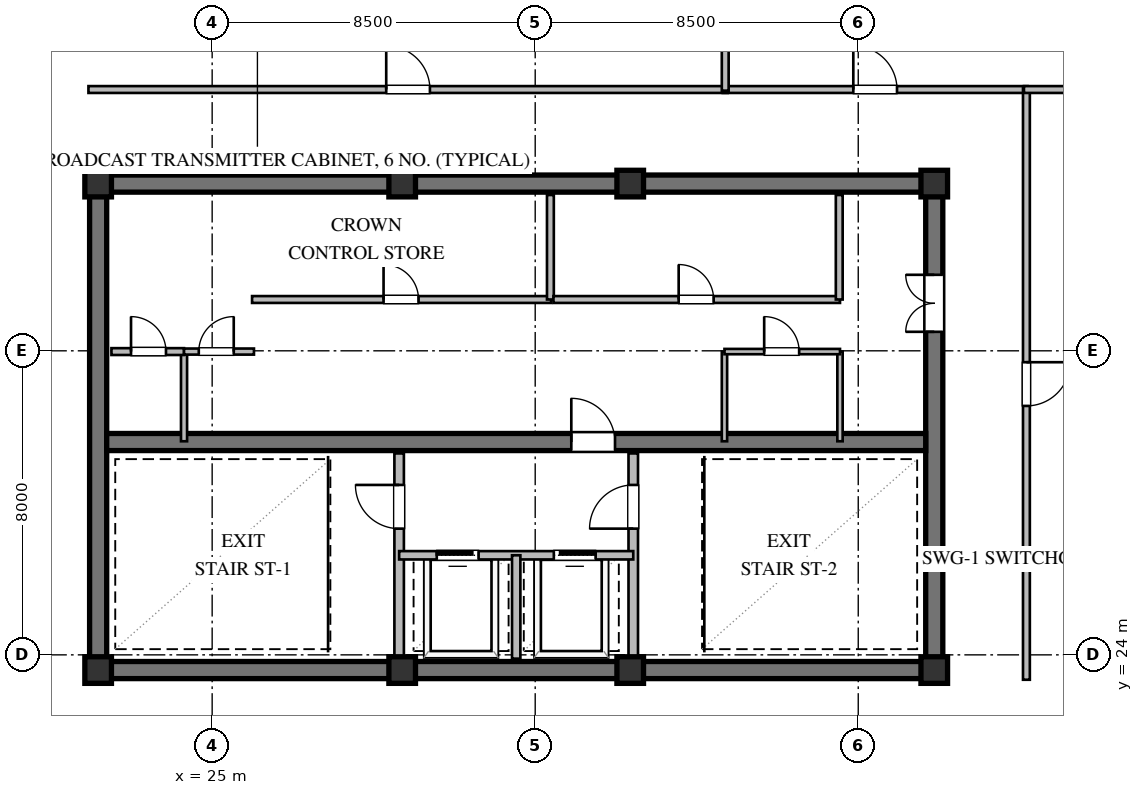
"""IFC4 building model, lengths in metres.
Left out: names, types, materials, properties, quantities, classifications, styles, units other than length and angle.
Written with IfcOpenShell. Run it as: python <this file> out.ifc"""

import sys

from ifc_helpers import new_model, si_unit, direction, frame, frame_2d, origin, origin_2d, place, context, subcontext, project, spatial, rectangle, extrude, element, fill, save


model = new_model("IFC4")
c1 = context("Model", 3, precision=1e-05, world=origin(), true_north=direction((0.0, 1.0)))
c2 = subcontext(c1, "Body", "Model", "MODEL_VIEW")
j1 = project(units=[si_unit("LENGTHUNIT", "METRE"), si_unit("PLANEANGLEUNIT", "RADIAN")], contexts=[c1])
p1 = place(None, origin())
s1 = spatial("IfcSite", under=j1, at=p1, CompositionType="ELEMENT")
p2 = place(p1, origin())
s2 = spatial("IfcBuilding", under=s1, at=p2, CompositionType="ELEMENT")
p3 = place(p2, frame((0.0, 0.0, 308.8)))
s3 = spatial("IfcBuildingStorey", under=s2, at=p3, CompositionType="ELEMENT", Elevation=308.8)
for number, where, z_axis, x_axis in (
    (1, (21.775, 23.6, 0.0), (0.0, 0.0, 1.0), (1.0, 0.0, 0.0)),
    (2, (21.775, 36.4, 0.0), (0.0, 0.0, 1.0), (1.0, 0.0, 0.0)),
):
    element("IfcWall", number, at=place(p3, frame(where, z_axis=z_axis, x_axis=x_axis)), inside=s3, PredefinedType="SHEAR", context=c2, shape_type="SweptSolid", body=[
        extrude(rectangle(XDim=22.45, YDim=0.45, at=frame_2d((11.225, 0.0))), origin(), (0.0, 0.0, 1.0), 3.7),
    ])
p4 = place(p3, frame((22.0, 23.825, 0.0), z_axis=(0.0, 0.0, 1.0), x_axis=(0.0, 1.0, 0.0)))
e3 = element("IfcWall", 3, at=p4, inside=s3, PredefinedType="SHEAR", context=c2, shape_type="SweptSolid", body=[
    extrude(rectangle(XDim=12.35, YDim=0.45, at=frame_2d((6.175, 0.0))), origin(), (0.0, 0.0, 1.0), 3.7),
])
p5 = place(p3, frame((44.0, 23.825, 0.0), z_axis=(0.0, 0.0, 1.0), x_axis=(0.0, 1.0, 0.0)))
e4 = element("IfcWall", 4, at=p5, inside=s3, PredefinedType="SHEAR", context=c2, shape_type="SweptSolid", body=[
    extrude(rectangle(XDim=12.35, YDim=0.45, at=frame_2d((6.175, 0.0))), origin(), (0.0, 0.0, 1.0), 3.7),
])
p6 = place(p5, frame((8.675, 0.0, 0.0)))
e5 = element("IfcOpeningElement", 5, at=p6, cuts=e4, PredefinedType="OPENING", context=c2, shape_type="SweptSolid", body=[
    extrude(rectangle(XDim=1.5, YDim=2.15, at=frame_2d((0.75, 1.075))), frame((0.0, 0.235, 0.0), z_axis=(0.0, -1.0, 0.0), x_axis=(1.0, 0.0, 0.0)), (0.0, 0.0, 1.0), 0.47),
])
p7 = place(p3, frame((22.225, 29.6, 0.0), z_axis=(0.0, 0.0, 1.0), x_axis=(1.0, 0.0, 0.0)))
e6 = element("IfcWall", 6, at=p7, inside=s3, PredefinedType="SHEAR", context=c2, shape_type="SweptSolid", body=[
    extrude(rectangle(XDim=21.55, YDim=0.45, at=frame_2d((10.775, 0.0))), origin(), (0.0, 0.0, 1.0), 3.7),
])
p8 = place(p7, frame((12.225, 0.0, 0.0)))
e7 = element("IfcOpeningElement", 7, at=p8, cuts=e6, PredefinedType="OPENING", context=c2, shape_type="SweptSolid", body=[
    extrude(rectangle(XDim=1.15, YDim=2.1, at=frame_2d((0.575, 1.05))), frame((0.0, 0.235, 0.0), z_axis=(0.0, -1.0, 0.0), x_axis=(1.0, 0.0, 0.0)), (0.0, 0.0, 1.0), 0.47),
])
for number, where, z_axis, x_axis in (
    (8, (22.0, 23.6, 0.0), (0.0, 0.0, 1.0), (1.0, 0.0, 0.0)),
    (9, (30.0, 23.6, 0.0), (0.0, 0.0, 1.0), (1.0, 0.0, 0.0)),
    (10, (36.0, 23.6, 0.0), (0.0, 0.0, 1.0), (1.0, 0.0, 0.0)),
    (11, (44.0, 23.6, 0.0), (0.0, 0.0, 1.0), (1.0, 0.0, 0.0)),
    (12, (44.0, 36.4, 0.0), (0.0, 0.0, 1.0), (1.0, 0.0, 0.0)),
    (13, (36.0, 36.4, 0.0), (0.0, 0.0, 1.0), (1.0, 0.0, 0.0)),
    (14, (30.0, 36.4, 0.0), (0.0, 0.0, 1.0), (1.0, 0.0, 0.0)),
    (15, (22.0, 36.4, 0.0), (0.0, 0.0, 1.0), (1.0, 0.0, 0.0)),
):
    element("IfcColumn", number, at=place(p3, frame(where, z_axis=z_axis, x_axis=x_axis)), inside=s3, PredefinedType="COLUMN", context=c2, shape_type="SweptSolid", body=[
        extrude(rectangle(XDim=0.7, YDim=0.7, at=origin_2d()), origin(), (0.0, 0.0, 1.0), 4.0),
    ])
p9 = place(p3, frame((56.357, 23.077, 0.0), z_axis=(0.0, 0.0, 1.0), x_axis=(-0.814111303181, -0.580708865123, 0.0)))
e16 = element("IfcWall", 16, at=p9, inside=s3, PredefinedType="STANDARD", context=c2, shape_type="SweptSolid", body=[
    extrude(rectangle(XDim=12.481, YDim=0.3, at=frame_2d((6.24, 0.0))), origin(), (0.0, 0.0, 1.0), 3.7),
])
p10 = place(p3, frame((29.92, 23.9, 0.0), z_axis=(0.0, 0.0, 1.0), x_axis=(0.0, 1.0, 0.0)))
e17 = element("IfcWall", 17, at=p10, inside=s3, PredefinedType="SOLIDWALL", context=c2, shape_type="SweptSolid", body=[
    extrude(rectangle(XDim=5.4, YDim=0.25, at=frame_2d((2.7, 0.0))), origin(), (0.0, 0.0, 1.0), 3.7),
])
p11 = place(p10, frame((3.421, 0.0, 0.0)))
e18 = element("IfcOpeningElement", 18, at=p11, cuts=e17, PredefinedType="OPENING", context=c2, shape_type="SweptSolid", body=[
    extrude(rectangle(XDim=1.15, YDim=2.1, at=frame_2d((0.575, 1.05))), frame((0.0, 0.135, 0.0), z_axis=(0.0, -1.0, 0.0), x_axis=(1.0, 0.0, 0.0)), (0.0, 0.0, 1.0), 0.27),
])
p12 = place(p3, frame((36.08, 23.9, 0.0), z_axis=(0.0, 0.0, 1.0), x_axis=(0.0, 1.0, 0.0)))
e19 = element("IfcWall", 19, at=p12, inside=s3, PredefinedType="SOLIDWALL", context=c2, shape_type="SweptSolid", body=[
    extrude(rectangle(XDim=5.4, YDim=0.25, at=frame_2d((2.7, 0.0))), origin(), (0.0, 0.0, 1.0), 3.7),
])
p13 = place(p12, frame((3.421, 0.0, 0.0)))
e20 = element("IfcOpeningElement", 20, at=p13, cuts=e19, PredefinedType="OPENING", context=c2, shape_type="SweptSolid", body=[
    extrude(rectangle(XDim=1.15, YDim=2.1, at=frame_2d((0.575, 1.05))), frame((0.0, 0.135, 0.0), z_axis=(0.0, -1.0, 0.0), x_axis=(1.0, 0.0, 0.0)), (0.0, 0.0, 1.0), 0.27),
])
p14 = place(p3, frame((29.92, 26.62, 0.0), z_axis=(0.0, 0.0, 1.0), x_axis=(1.0, 0.0, 0.0)))
e21 = element("IfcWall", 21, at=p14, inside=s3, PredefinedType="SOLIDWALL", context=c2, shape_type="SweptSolid", body=[
    extrude(rectangle(XDim=6.16, YDim=0.22, at=frame_2d((3.08, 0.0))), origin(), (0.0, 0.0, 1.0), 3.7),
])
p15 = place(p14, frame((0.99, 0.0, 0.0)))
e22 = element("IfcOpeningElement", 22, at=p15, cuts=e21, PredefinedType="OPENING", context=c2, shape_type="SweptSolid", body=[
    extrude(rectangle(XDim=1.1, YDim=2.1, at=frame_2d((0.55, 1.05))), frame((0.0, 0.12, 0.0), z_axis=(0.0, -1.0, 0.0), x_axis=(1.0, 0.0, 0.0)), (0.0, 0.0, 1.0), 0.24),
])
p16 = place(p14, frame((4.07, 0.0, 0.0)))
e23 = element("IfcOpeningElement", 23, at=p16, cuts=e21, PredefinedType="OPENING", context=c2, shape_type="SweptSolid", body=[
    extrude(rectangle(XDim=1.1, YDim=2.1, at=frame_2d((0.55, 1.05))), frame((0.0, 0.12, 0.0), z_axis=(0.0, -1.0, 0.0), x_axis=(1.0, 0.0, 0.0)), (0.0, 0.0, 1.0), 0.24),
])
p17 = place(p3, frame((33.0, 23.9, 0.0), z_axis=(0.0, 0.0, 1.0), x_axis=(0.0, 1.0, 0.0)))
e24 = element("IfcWall", 24, at=p17, inside=s3, PredefinedType="SOLIDWALL", context=c2, shape_type="SweptSolid", body=[
    extrude(rectangle(XDim=2.72, YDim=0.22, at=frame_2d((1.36, 0.0))), origin(), (0.0, 0.0, 1.0), 3.7),
])
p18 = place(p3, frame((26.05, 33.35, 0.0), z_axis=(0.0, 0.0, 1.0), x_axis=(1.0, 0.0, 0.0)))
e25 = element("IfcWall", 25, at=p18, inside=s3, PredefinedType="PARTITIONING", context=c2, shape_type="SweptSolid", body=[
    extrude(rectangle(XDim=7.87, YDim=0.18, at=frame_2d((3.935, 0.0))), origin(), (0.0, 0.0, 1.0), 3.7),
])
p19 = place(p18, frame((3.46, 0.0, 0.0)))
e26 = element("IfcOpeningElement", 26, at=p19, cuts=e25, PredefinedType="OPENING", context=c2, shape_type="SweptSolid", body=[
    extrude(rectangle(XDim=0.92, YDim=2.1, at=frame_2d((0.46, 1.05))), frame((0.0, 0.1, 0.0), z_axis=(0.0, -1.0, 0.0), x_axis=(1.0, 0.0, 0.0)), (0.0, 0.0, 1.0), 0.2),
])
p20 = place(p3, frame((33.9, 33.35, 0.0), z_axis=(0.0, 0.0, 1.0), x_axis=(0.0, 1.0, 0.0)))
e27 = element("IfcWall", 27, at=p20, inside=s3, PredefinedType="PARTITIONING", context=c2, shape_type="SweptSolid", body=[
    extrude(rectangle(XDim=2.75, YDim=0.18, at=frame_2d((1.375, 0.0))), origin(), (0.0, 0.0, 1.0), 3.7),
])
p21 = place(p3, frame((33.98, 33.35, 0.0), z_axis=(0.0, 0.0, 1.0), x_axis=(1.0, 0.0, 0.0)))
e28 = element("IfcWall", 28, at=p21, inside=s3, PredefinedType="PARTITIONING", context=c2, shape_type="SweptSolid", body=[
    extrude(rectangle(XDim=7.54, YDim=0.18, at=frame_2d((3.77, 0.0))), origin(), (0.0, 0.0, 1.0), 3.7),
])
p22 = place(p21, frame((3.295, 0.0, 0.0)))
e29 = element("IfcOpeningElement", 29, at=p22, cuts=e28, PredefinedType="OPENING", context=c2, shape_type="SweptSolid", body=[
    extrude(rectangle(XDim=0.92, YDim=2.1, at=frame_2d((0.46, 1.05))), frame((0.0, 0.1, 0.0), z_axis=(0.0, -1.0, 0.0), x_axis=(1.0, 0.0, 0.0)), (0.0, 0.0, 1.0), 0.2),
])
p23 = place(p3, frame((41.5, 33.35, 0.0), z_axis=(0.0, 0.0, 1.0), x_axis=(0.0, 1.0, 0.0)))
e30 = element("IfcWall", 30, at=p23, inside=s3, PredefinedType="PARTITIONING", context=c2, shape_type="SweptSolid", body=[
    extrude(rectangle(XDim=2.75, YDim=0.18, at=frame_2d((1.375, 0.0))), origin(), (0.0, 0.0, 1.0), 3.7),
])
p24 = place(p3, frame((24.26, 29.62, 0.0), z_axis=(0.0, 0.0, 1.0), x_axis=(0.0, 1.0, 0.0)))
e31 = element("IfcWall", 31, at=p24, inside=s3, PredefinedType="PLUMBINGWALL", context=c2, shape_type="SweptSolid", body=[
    extrude(rectangle(XDim=2.36, YDim=0.16, at=frame_2d((1.18, 0.0))), origin(), (0.0, 0.0, 1.0), 3.7),
])
p25 = place(p3, frame((22.35, 31.98, 0.0), z_axis=(0.0, 0.0, 1.0), x_axis=(1.0, 0.0, 0.0)))
e32 = element("IfcWall", 32, at=p25, inside=s3, PredefinedType="PARTITIONING", context=c2, shape_type="SweptSolid", body=[
    extrude(rectangle(XDim=1.91, YDim=0.18, at=frame_2d((0.955, 0.0))), origin(), (0.0, 0.0, 1.0), 3.7),
])
p26 = place(p25, frame((0.515, 0.0, 0.0)))
e33 = element("IfcOpeningElement", 33, at=p26, cuts=e32, PredefinedType="OPENING", context=c2, shape_type="SweptSolid", body=[
    extrude(rectangle(XDim=0.92, YDim=2.1, at=frame_2d((0.46, 1.05))), frame((0.0, 0.1, 0.0), z_axis=(0.0, -1.0, 0.0), x_axis=(1.0, 0.0, 0.0)), (0.0, 0.0, 1.0), 0.2),
])
p27 = place(p3, frame((24.26, 31.98, 0.0), z_axis=(0.0, 0.0, 1.0), x_axis=(1.0, 0.0, 0.0)))
e34 = element("IfcWall", 34, at=p27, inside=s3, PredefinedType="PLUMBINGWALL", context=c2, shape_type="SweptSolid", body=[
    extrude(rectangle(XDim=1.84, YDim=0.16, at=frame_2d((0.92, 0.0))), origin(), (0.0, 0.0, 1.0), 3.7),
])
p28 = place(p27, frame((0.388, 0.0, 0.0)))
e35 = element("IfcOpeningElement", 35, at=p28, cuts=e34, PredefinedType="OPENING", context=c2, shape_type="SweptSolid", body=[
    extrude(rectangle(XDim=0.92, YDim=2.1, at=frame_2d((0.46, 1.05))), frame((0.0, 0.09, 0.0), z_axis=(0.0, -1.0, 0.0), x_axis=(1.0, 0.0, 0.0)), (0.0, 0.0, 1.0), 0.18),
])
for number, where, z_axis, x_axis in (
    (36, (38.48, 29.62, 0.0), (0.0, 0.0, 1.0), (0.0, 1.0, 0.0)),
    (37, (41.52, 29.62, 0.0), (0.0, 0.0, 1.0), (0.0, 1.0, 0.0)),
):
    element("IfcWall", number, at=place(p3, frame(where, z_axis=z_axis, x_axis=x_axis)), inside=s3, PredefinedType="PARTITIONING", context=c2, shape_type="SweptSolid", body=[
        extrude(rectangle(XDim=2.36, YDim=0.14, at=frame_2d((1.18, 0.0))), origin(), (0.0, 0.0, 1.0), 3.7),
    ])
p29 = place(p3, frame((38.48, 31.98, 0.0), z_axis=(0.0, 0.0, 1.0), x_axis=(1.0, 0.0, 0.0)))
e38 = element("IfcWall", 38, at=p29, inside=s3, PredefinedType="PARTITIONING", context=c2, shape_type="SweptSolid", body=[
    extrude(rectangle(XDim=3.04, YDim=0.14, at=frame_2d((1.52, 0.0))), origin(), (0.0, 0.0, 1.0), 3.7),
])
p30 = place(p29, frame((1.045, 0.0, 0.0)))
e39 = element("IfcOpeningElement", 39, at=p30, cuts=e38, PredefinedType="OPENING", context=c2, shape_type="SweptSolid", body=[
    extrude(rectangle(XDim=0.92, YDim=2.1, at=frame_2d((0.46, 1.05))), frame((0.0, 0.08, 0.0), z_axis=(0.0, -1.0, 0.0), x_axis=(1.0, 0.0, 0.0)), (0.0, 0.0, 1.0), 0.16),
])
p31 = place(p3, frame((21.745, 38.875, 0.0), z_axis=(0.0, 0.0, 1.0), x_axis=(1.0, 0.0, 0.0)))
e40 = element("IfcWall", 40, at=p31, inside=s3, PredefinedType="PARTITIONING", context=c2, shape_type="SweptSolid", body=[
    extrude(rectangle(XDim=16.82, YDim=0.18, at=frame_2d((8.41, 0.0))), origin(), (0.0, 0.0, 1.0), 3.7),
])
p32 = place(p31, frame((7.835, 0.0, 0.0)))
e41 = element("IfcOpeningElement", 41, at=p32, cuts=e40, PredefinedType="OPENING", context=c2, shape_type="SweptSolid", body=[
    extrude(rectangle(XDim=1.15, YDim=2.1, at=frame_2d((0.575, 1.05))), frame((0.0, 0.1, 0.0), z_axis=(0.0, -1.0, 0.0), x_axis=(1.0, 0.0, 0.0)), (0.0, 0.0, 1.0), 0.2),
])
p33 = place(p3, frame((38.435, 38.875, 0.0), z_axis=(0.0, 0.0, 1.0), x_axis=(1.0, 0.0, 0.0)))
e42 = element("IfcWall", 42, at=p33, inside=s3, PredefinedType="PARTITIONING", context=c2, shape_type="SweptSolid", body=[
    extrude(rectangle(XDim=8.02, YDim=0.18, at=frame_2d((4.01, 0.0))), origin(), (0.0, 0.0, 1.0), 3.7),
])
p34 = place(p33, frame((3.435, 0.0, 0.0)))
e43 = element("IfcOpeningElement", 43, at=p34, cuts=e42, PredefinedType="OPENING", context=c2, shape_type="SweptSolid", body=[
    extrude(rectangle(XDim=1.15, YDim=2.1, at=frame_2d((0.575, 1.05))), frame((0.0, 0.1, 0.0), z_axis=(0.0, -1.0, 0.0), x_axis=(1.0, 0.0, 0.0)), (0.0, 0.0, 1.0), 0.2),
])
p35 = place(p3, frame((46.425, 38.905, 0.0), z_axis=(0.0, 0.0, 1.0), x_axis=(0.0, -1.0, 0.0)))
e44 = element("IfcWall", 44, at=p35, inside=s3, PredefinedType="PARTITIONING", context=c2, shape_type="SweptSolid", body=[
    extrude(rectangle(XDim=15.56, YDim=0.18, at=frame_2d((7.78, 0.0))), origin(), (0.0, 0.0, 1.0), 3.7),
])
p36 = place(p35, frame((7.205, 0.0, 0.0)))
e45 = element("IfcOpeningElement", 45, at=p36, cuts=e44, PredefinedType="OPENING", context=c2, shape_type="SweptSolid", body=[
    extrude(rectangle(XDim=1.15, YDim=2.1, at=frame_2d((0.575, 1.05))), frame((0.0, 0.1, 0.0), z_axis=(0.0, -1.0, 0.0), x_axis=(1.0, 0.0, 0.0)), (0.0, 0.0, 1.0), 0.2),
])
p37 = place(p3, frame((38.5, 53.344, 0.0), z_axis=(0.0, 0.0, 1.0), x_axis=(0.0, -1.0, 0.0)))
e46 = element("IfcWall", 46, at=p37, inside=s3, PredefinedType="PARTITIONING", context=c2, shape_type="SweptSolid", body=[
    extrude(rectangle(XDim=14.499, YDim=0.18, at=frame_2d((7.25, 0.0))), origin(), (0.0, 0.0, 1.0), 3.7),
])
p38 = place(p3, frame((59.517, 38.875, 0.0), z_axis=(0.0, 0.0, 1.0), x_axis=(-1.0, 0.0, 0.0)))
e47 = element("IfcWall", 47, at=p38, inside=s3, PredefinedType="PARTITIONING", context=c2, shape_type="SweptSolid", body=[
    extrude(rectangle(XDim=13.157, YDim=0.18, at=frame_2d((6.579, 0.0))), origin(), (0.0, 0.0, 1.0), 3.7),
])
p39 = place(p11, origin())
e48 = element("IfcDoor", 48, at=p39, inside=s3, OperationType="SINGLE_SWING_RIGHT", PredefinedType="DOOR", context=c2, shape_type="SweptSolid", body=[
    extrude(rectangle(XDim=1.15, YDim=2.1, at=frame_2d((0.575, 1.05))), frame((0.0, 0.025, 0.0), z_axis=(0.0, -1.0, 0.0), x_axis=(1.0, 0.0, 0.0)), (0.0, 0.0, 1.0), 0.05),
])
fill(e18, e48)
p40 = place(p13, origin())
e49 = element("IfcDoor", 49, at=p40, inside=s3, OperationType="SINGLE_SWING_LEFT", PredefinedType="DOOR", context=c2, shape_type="SweptSolid", body=[
    extrude(rectangle(XDim=1.15, YDim=2.1, at=frame_2d((0.575, 1.05))), frame((0.0, 0.025, 0.0), z_axis=(0.0, -1.0, 0.0), x_axis=(1.0, 0.0, 0.0)), (0.0, 0.0, 1.0), 0.05),
])
fill(e20, e49)
p41 = place(p15, origin())
e50 = element("IfcDoor", 50, at=p41, inside=s3, OperationType="SLIDING_TO_LEFT", PredefinedType="DOOR", context=c2, shape_type="SweptSolid", body=[
    extrude(rectangle(XDim=1.1, YDim=2.1, at=frame_2d((0.55, 1.05))), frame((0.0, 0.025, 0.0), z_axis=(0.0, -1.0, 0.0), x_axis=(1.0, 0.0, 0.0)), (0.0, 0.0, 1.0), 0.05),
])
fill(e22, e50)
p42 = place(p16, origin())
e51 = element("IfcDoor", 51, at=p42, inside=s3, OperationType="SLIDING_TO_RIGHT", PredefinedType="DOOR", context=c2, shape_type="SweptSolid", body=[
    extrude(rectangle(XDim=1.1, YDim=2.1, at=frame_2d((0.55, 1.05))), frame((0.0, 0.025, 0.0), z_axis=(0.0, -1.0, 0.0), x_axis=(1.0, 0.0, 0.0)), (0.0, 0.0, 1.0), 0.05),
])
fill(e23, e51)
p43 = place(p8, origin())
e52 = element("IfcDoor", 52, at=p43, inside=s3, OperationType="SINGLE_SWING_LEFT", PredefinedType="DOOR", context=c2, shape_type="SweptSolid", body=[
    extrude(rectangle(XDim=1.15, YDim=2.1, at=frame_2d((0.575, 1.05))), frame((0.0, 0.025, 0.0), z_axis=(0.0, -1.0, 0.0), x_axis=(1.0, 0.0, 0.0)), (0.0, 0.0, 1.0), 0.05),
])
fill(e7, e52)
p44 = place(p6, origin())
e53 = element("IfcDoor", 53, at=p44, inside=s3, OperationType="DOUBLE_DOOR_SINGLE_SWING", PredefinedType="DOOR", context=c2, shape_type="SweptSolid", body=[
    extrude(rectangle(XDim=1.5, YDim=2.15, at=frame_2d((0.75, 1.075))), frame((0.0, 0.025, 0.0), z_axis=(0.0, -1.0, 0.0), x_axis=(1.0, 0.0, 0.0)), (0.0, 0.0, 1.0), 0.05),
])
fill(e5, e53)
p45 = place(p19, origin())
e54 = element("IfcDoor", 54, at=p45, inside=s3, OperationType="SINGLE_SWING_LEFT", PredefinedType="DOOR", context=c2, shape_type="SweptSolid", body=[
    extrude(rectangle(XDim=0.92, YDim=2.1, at=frame_2d((0.46, 1.05))), frame((0.0, 0.025, 0.0), z_axis=(0.0, -1.0, 0.0), x_axis=(1.0, 0.0, 0.0)), (0.0, 0.0, 1.0), 0.05),
])
fill(e26, e54)
p46 = place(p22, origin())
e55 = element("IfcDoor", 55, at=p46, inside=s3, OperationType="SINGLE_SWING_LEFT", PredefinedType="DOOR", context=c2, shape_type="SweptSolid", body=[
    extrude(rectangle(XDim=0.92, YDim=2.1, at=frame_2d((0.46, 1.05))), frame((0.0, 0.025, 0.0), z_axis=(0.0, -1.0, 0.0), x_axis=(1.0, 0.0, 0.0)), (0.0, 0.0, 1.0), 0.05),
])
fill(e29, e55)
p47 = place(p26, origin())
e56 = element("IfcDoor", 56, at=p47, inside=s3, OperationType="SINGLE_SWING_LEFT", PredefinedType="DOOR", context=c2, shape_type="SweptSolid", body=[
    extrude(rectangle(XDim=0.92, YDim=2.1, at=frame_2d((0.46, 1.05))), frame((0.0, 0.025, 0.0), z_axis=(0.0, -1.0, 0.0), x_axis=(1.0, 0.0, 0.0)), (0.0, 0.0, 1.0), 0.05),
])
fill(e33, e56)
p48 = place(p28, origin())
e57 = element("IfcDoor", 57, at=p48, inside=s3, OperationType="SINGLE_SWING_RIGHT", PredefinedType="DOOR", context=c2, shape_type="SweptSolid", body=[
    extrude(rectangle(XDim=0.92, YDim=2.1, at=frame_2d((0.46, 1.05))), frame((0.0, 0.025, 0.0), z_axis=(0.0, -1.0, 0.0), x_axis=(1.0, 0.0, 0.0)), (0.0, 0.0, 1.0), 0.05),
])
fill(e35, e57)
p49 = place(p30, origin())
e58 = element("IfcDoor", 58, at=p49, inside=s3, OperationType="SINGLE_SWING_LEFT", PredefinedType="DOOR", context=c2, shape_type="SweptSolid", body=[
    extrude(rectangle(XDim=0.92, YDim=2.1, at=frame_2d((0.46, 1.05))), frame((0.0, 0.025, 0.0), z_axis=(0.0, -1.0, 0.0), x_axis=(1.0, 0.0, 0.0)), (0.0, 0.0, 1.0), 0.05),
])
fill(e39, e58)
p50 = place(p32, origin())
e59 = element("IfcDoor", 59, at=p50, inside=s3, OperationType="SINGLE_SWING_LEFT", PredefinedType="DOOR", context=c2, shape_type="SweptSolid", body=[
    extrude(rectangle(XDim=1.15, YDim=2.1, at=frame_2d((0.575, 1.05))), frame((0.0, 0.025, 0.0), z_axis=(0.0, -1.0, 0.0), x_axis=(1.0, 0.0, 0.0)), (0.0, 0.0, 1.0), 0.05),
])
fill(e41, e59)
p51 = place(p34, origin())
e60 = element("IfcDoor", 60, at=p51, inside=s3, OperationType="SINGLE_SWING_LEFT", PredefinedType="DOOR", context=c2, shape_type="SweptSolid", body=[
    extrude(rectangle(XDim=1.15, YDim=2.1, at=frame_2d((0.575, 1.05))), frame((0.0, 0.025, 0.0), z_axis=(0.0, -1.0, 0.0), x_axis=(1.0, 0.0, 0.0)), (0.0, 0.0, 1.0), 0.05),
])
fill(e43, e60)
p52 = place(p36, origin())
e61 = element("IfcDoor", 61, at=p52, inside=s3, OperationType="SINGLE_SWING_LEFT", PredefinedType="DOOR", context=c2, shape_type="SweptSolid", body=[
    extrude(rectangle(XDim=1.15, YDim=2.1, at=frame_2d((0.575, 1.05))), frame((0.0, 0.025, 0.0), z_axis=(0.0, -1.0, 0.0), x_axis=(1.0, 0.0, 0.0)), (0.0, 0.0, 1.0), 0.05),
])
fill(e45, e61)
save(model, sys.argv[1])
